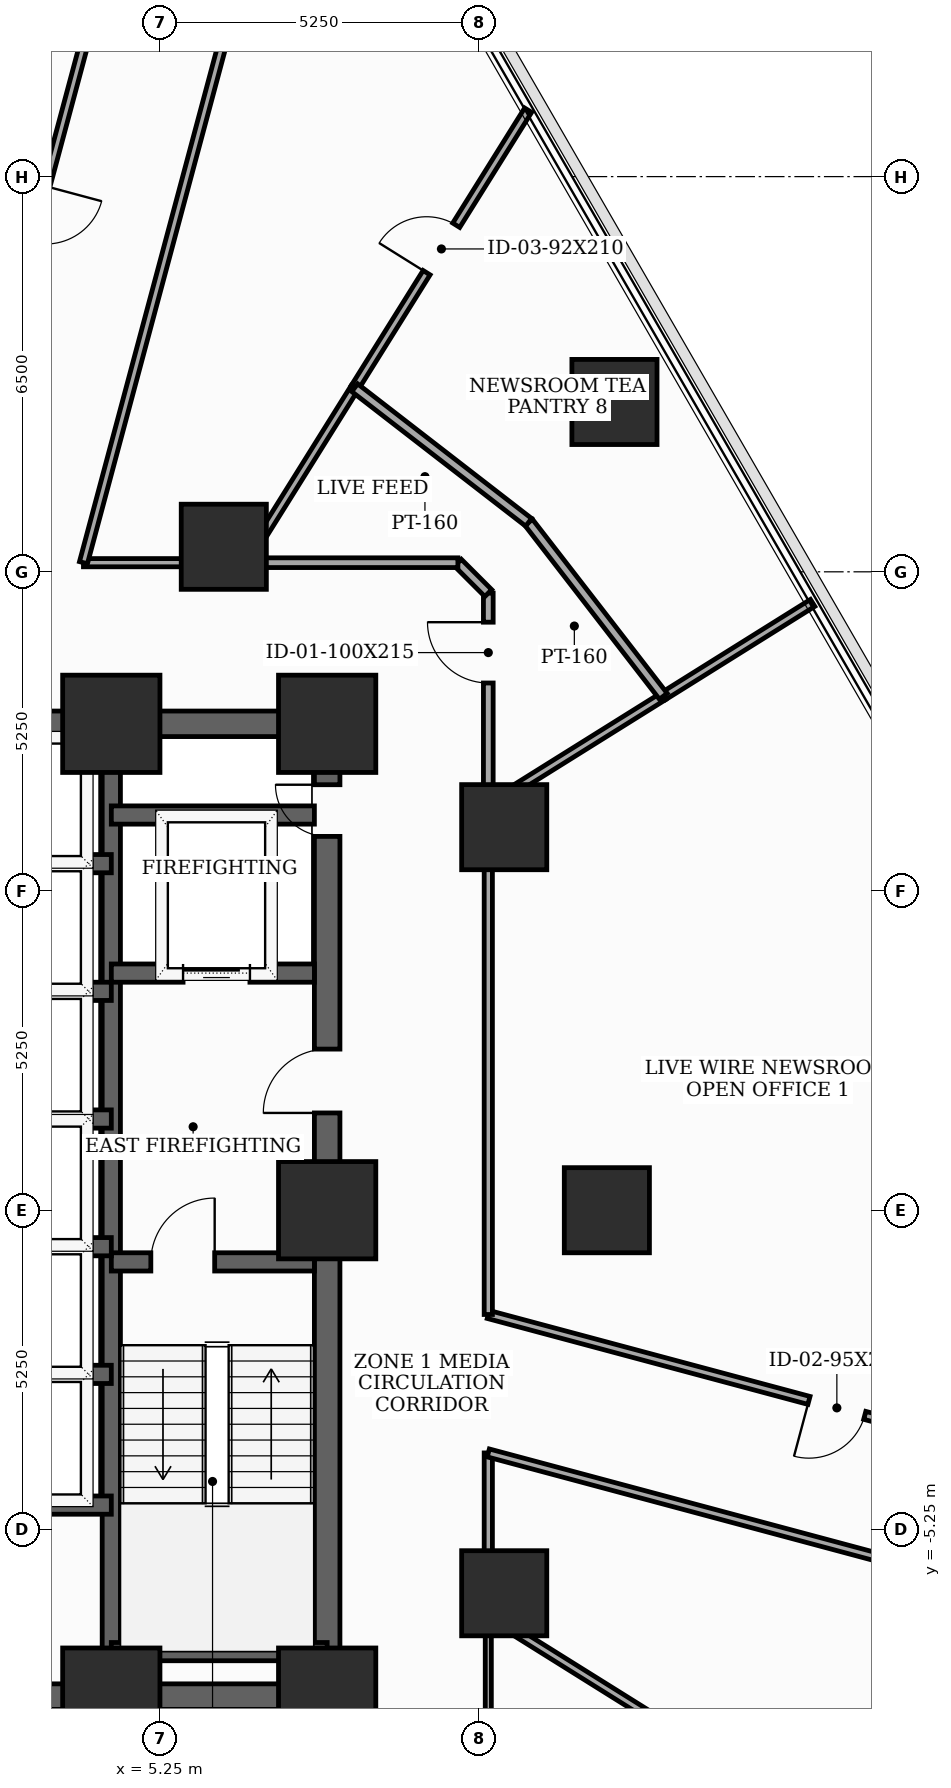
"""IFC4 building model, lengths in metres.
Left out: names, types, materials, properties, quantities, classifications, styles, units other than length and angle.
Written with IfcOpenShell. Run it as: python <this file> out.ifc"""

import sys

from ifc_helpers import new_model, si_unit, direction, frame, frame_2d, origin, origin_2d, place, context, subcontext, project, spatial, rectangle, extrude, element, fill, save


model = new_model("IFC4")
c1 = context("Model", 3, precision=1e-05, world=origin(), true_north=direction((0.0, 1.0)))
c2 = subcontext(c1, "Body", "Model", "MODEL_VIEW")
j1 = project(units=[si_unit("LENGTHUNIT", "METRE"), si_unit("PLANEANGLEUNIT", "RADIAN")], contexts=[c1])
p1 = place(None, origin())
s1 = spatial("IfcSite", under=j1, at=p1, CompositionType="ELEMENT")
p2 = place(p1, origin())
s2 = spatial("IfcBuilding", under=s1, at=p2, CompositionType="ELEMENT")
p3 = place(p2, frame((0.0, 0.0, 29.7)))
s3 = spatial("IfcBuildingStorey", under=s2, at=p3, CompositionType="ELEMENT", Elevation=29.7)
for number, where, z_axis, x_axis in (
    (1, (4.45, -8.0, 0.0), (0.0, 0.0, 1.0), (1.0, 0.0, 0.0)),
    (2, (8.0, -8.0, 0.0), (0.0, 0.0, 1.0), (1.0, 0.0, 0.0)),
    (3, (8.0, 0.0, 0.0), (0.0, 0.0, 1.0), (1.0, 0.0, 0.0)),
    (4, (8.0, 8.0, 0.0), (0.0, 0.0, 1.0), (1.0, 0.0, 0.0)),
    (5, (4.45, 8.0, 0.0), (0.0, 0.0, 1.0), (1.0, 0.0, 0.0)),
):
    element("IfcColumn", number, at=place(p3, frame(where, z_axis=z_axis, x_axis=x_axis)), inside=s3, PredefinedType="COLUMN", context=c2, shape_type="SweptSolid", body=[
        extrude(rectangle(XDim=1.6, YDim=1.6, at=origin_2d()), origin(), (0.0, 0.0, 1.0), 3.7),
    ])
for number, where, z_axis, x_axis in (
    (6, (12.6, 0.0, 0.0), (0.0, 0.0, 1.0), (1.0, 0.0, 0.0)),
    (7, (10.912, 6.3, 0.0), (0.0, 0.0, 1.0), (1.0, 0.0, 0.0)),
    (8, (6.3, 10.912, 0.0), (0.0, 0.0, 1.0), (1.0, 0.0, 0.0)),
    (9, (10.912, -6.3, 0.0), (0.0, 0.0, 1.0), (1.0, 0.0, 0.0)),
    (10, (12.725, 13.293, 0.0), (0.0, 0.0, 1.0), (1.0, 0.0, 0.0)),
):
    element("IfcColumn", number, at=place(p3, frame(where, z_axis=z_axis, x_axis=x_axis)), inside=s3, PredefinedType="COLUMN", context=c2, shape_type="SweptSolid", body=[
        extrude(rectangle(XDim=1.4, YDim=1.4, at=origin_2d()), origin(), (0.0, 0.0, 1.0), 3.7),
    ])
p4 = place(p3, frame((8.0, -8.0, 0.0), z_axis=(0.0, 0.0, 1.0), x_axis=(0.0, 1.0, 0.0)))
e11 = element("IfcWall", 11, at=p4, inside=s3, PredefinedType="SHEAR", context=c2, shape_type="SweptSolid", body=[
    extrude(rectangle(XDim=16.0, YDim=0.42, at=frame_2d((8.0, 0.0))), origin(), (0.0, 0.0, 1.0), 3.5),
])
p5 = place(p4, frame((9.6, 0.0, 0.0)))
e12 = element("IfcOpeningElement", 12, at=p5, cuts=e11, PredefinedType="OPENING", context=c2, shape_type="SweptSolid", body=[
    extrude(rectangle(XDim=1.05, YDim=2.15, at=frame_2d((0.525, 1.075))), frame((0.0, 0.22, 0.0), z_axis=(0.0, -1.0, 0.0), x_axis=(1.0, 0.0, 0.0)), (0.0, 0.0, 1.0), 0.44),
])
p6 = place(p4, frame((14.148, 0.0, 0.0)))
e13 = element("IfcOpeningElement", 13, at=p6, cuts=e11, PredefinedType="OPENING", context=c2, shape_type="SweptSolid", body=[
    extrude(rectangle(XDim=0.85, YDim=2.02, at=frame_2d((0.425, 1.01))), frame((0.0, 0.22, 0.0), z_axis=(0.0, -1.0, 0.0), x_axis=(1.0, 0.0, 0.0)), (0.0, 0.0, 1.0), 0.44),
])
p7 = place(p3, frame((-8.0, -8.0, 0.0), z_axis=(0.0, 0.0, 1.0), x_axis=(1.0, 0.0, 0.0)))
e14 = element("IfcWall", 14, at=p7, inside=s3, PredefinedType="SHEAR", context=c2, shape_type="SweptSolid", body=[
    extrude(rectangle(XDim=16.0, YDim=0.42, at=frame_2d((8.0, 0.0))), origin(), (0.0, 0.0, 1.0), 3.5),
])
p8 = place(p7, frame((7.52, 0.0, 0.0)))
e15 = element("IfcOpeningElement", 15, at=p8, cuts=e14, PredefinedType="OPENING", context=c2, shape_type="SweptSolid", body=[
    extrude(rectangle(XDim=0.95, YDim=2.1, at=frame_2d((0.475, 1.05))), frame((0.0, 0.22, 0.0), z_axis=(0.0, -1.0, 0.0), x_axis=(1.0, 0.0, 0.0)), (0.0, 0.0, 1.0), 0.44),
])
p9 = place(p3, frame((-8.0, 8.0, 0.0), z_axis=(0.0, 0.0, 1.0), x_axis=(1.0, 0.0, 0.0)))
e16 = element("IfcWall", 16, at=p9, inside=s3, PredefinedType="SHEAR", context=c2, shape_type="SweptSolid", body=[
    extrude(rectangle(XDim=16.0, YDim=0.42, at=frame_2d((8.0, 0.0))), origin(), (0.0, 0.0, 1.0), 3.5),
])
p10 = place(p9, frame((7.1, 0.0, 0.0)))
e17 = element("IfcOpeningElement", 17, at=p10, cuts=e16, PredefinedType="OPENING", context=c2, shape_type="SweptSolid", body=[
    extrude(rectangle(XDim=1.8, YDim=2.15, at=frame_2d((0.9, 1.075))), frame((0.0, 0.22, 0.0), z_axis=(0.0, -1.0, 0.0), x_axis=(1.0, 0.0, 0.0)), (0.0, 0.0, 1.0), 0.44),
])
p11 = place(p3, frame((4.45, -7.79, 0.0), z_axis=(0.0, 0.0, 1.0), x_axis=(0.0, 1.0, 0.0)))
e18 = element("IfcWall", 18, at=p11, inside=s3, PredefinedType="SHEAR", context=c2, shape_type="SweptSolid", body=[
    extrude(rectangle(XDim=15.58, YDim=0.3, at=frame_2d((7.79, 0.0))), origin(), (0.0, 0.0, 1.0), 3.5),
])
p12 = place(p3, frame((4.45, -0.85, 0.0), z_axis=(0.0, 0.0, 1.0), x_axis=(1.0, 0.0, 0.0)))
e19 = element("IfcWall", 19, at=p12, inside=s3, PredefinedType="SHEAR", context=c2, shape_type="SweptSolid", body=[
    extrude(rectangle(XDim=3.34, YDim=0.3, at=frame_2d((1.67, 0.0))), origin(), (0.0, 0.0, 1.0), 3.5),
])
p13 = place(p12, frame((0.65, 0.0, 0.0)))
e20 = element("IfcOpeningElement", 20, at=p13, cuts=e19, PredefinedType="OPENING", context=c2, shape_type="SweptSolid", body=[
    extrude(rectangle(XDim=1.05, YDim=2.15, at=frame_2d((0.525, 1.075))), frame((0.0, 0.16, 0.0), z_axis=(0.0, -1.0, 0.0), x_axis=(1.0, 0.0, 0.0)), (0.0, 0.0, 1.0), 0.32),
])
p14 = place(p3, frame((4.45, -7.26, 0.0), z_axis=(0.0, 0.0, 1.0), x_axis=(1.0, 0.0, 0.0)))
e21 = element("IfcWall", 21, at=p14, inside=s3, PredefinedType="SHEAR", context=c2, shape_type="SweptSolid", body=[
    extrude(rectangle(XDim=3.55, YDim=0.3, at=frame_2d((1.775, 0.0))), origin(), (0.0, 0.0, 1.0), 3.5),
])
p15 = place(p3, frame((4.45, 3.9, 0.0), z_axis=(0.0, 0.0, 1.0), x_axis=(1.0, 0.0, 0.0)))
e22 = element("IfcWall", 22, at=p15, inside=s3, PredefinedType="SHEAR", context=c2, shape_type="SweptSolid", body=[
    extrude(rectangle(XDim=3.34, YDim=0.3, at=frame_2d((1.67, 0.0))), origin(), (0.0, 0.0, 1.0), 3.5),
])
p16 = place(p15, frame((1.18, 0.0, 0.0)))
e23 = element("IfcOpeningElement", 23, at=p16, cuts=e22, PredefinedType="OPENING", context=c2, shape_type="SweptSolid", body=[
    extrude(rectangle(XDim=1.1, YDim=2.1, at=frame_2d((0.55, 1.05))), frame((0.0, 0.16, 0.0), z_axis=(0.0, -1.0, 0.0), x_axis=(1.0, 0.0, 0.0)), (0.0, 0.0, 1.0), 0.32),
])
p17 = place(p3, frame((4.45, 6.5, 0.0), z_axis=(0.0, 0.0, 1.0), x_axis=(1.0, 0.0, 0.0)))
e24 = element("IfcWall", 24, at=p17, inside=s3, PredefinedType="SHEAR", context=c2, shape_type="SweptSolid", body=[
    extrude(rectangle(XDim=3.34, YDim=0.3, at=frame_2d((1.67, 0.0))), origin(), (0.0, 0.0, 1.0), 3.5),
])
p18 = place(p3, frame((-4.45, -4.85, 0.0), z_axis=(0.0, 0.0, 1.0), x_axis=(1.0, 0.0, 0.0)))
e25 = element("IfcWall", 25, at=p18, inside=s3, PredefinedType="SHEAR", context=c2, shape_type="SweptSolid", body=[
    extrude(rectangle(XDim=8.9, YDim=0.3, at=frame_2d((4.45, 0.0))), origin(), (0.0, 0.0, 1.0), 3.5),
])
for number, where, z_axis, x_axis in (
    (26, (1.68, 1.5, 0.0), (0.0, 0.0, 1.0), (1.0, 0.0, 0.0)),
    (27, (1.68, 3.6, 0.0), (0.0, 0.0, 1.0), (1.0, 0.0, 0.0)),
    (28, (1.68, 5.7, 0.0), (0.0, 0.0, 1.0), (1.0, 0.0, 0.0)),
    (29, (1.68, -2.7, 0.0), (0.0, 0.0, 1.0), (1.0, 0.0, 0.0)),
    (30, (1.68, -0.6, 0.0), (0.0, 0.0, 1.0), (1.0, 0.0, 0.0)),
):
    element("IfcWall", number, at=place(p3, frame(where, z_axis=z_axis, x_axis=x_axis)), inside=s3, PredefinedType="SHEAR", context=c2, shape_type="SweptSolid", body=[
        extrude(rectangle(XDim=2.77, YDim=0.3, at=frame_2d((1.385, 0.0))), origin(), (0.0, 0.0, 1.0), 3.5),
    ])
p19 = place(p3, frame((10.65, -6.655, 0.0), z_axis=(0.0, 0.0, 1.0), x_axis=(0.0, 1.0, 0.0)))
e31 = element("IfcWall", 31, at=p19, inside=s3, PredefinedType="PARTITIONING", context=c2, shape_type="SweptSolid", body=[
    extrude(rectangle(XDim=2.663, YDim=0.135, at=frame_2d((1.332, 0.0))), origin(), (0.0, 0.0, 1.0), 2.785),
])
p20 = place(p3, frame((10.65, -3.992, 0.0), z_axis=(0.0, 0.0, 1.0), x_axis=(0.965906888357, -0.258889712088, 0.0)))
e32 = element("IfcWall", 32, at=p20, inside=s3, PredefinedType="PARTITIONING", context=c2, shape_type="SweptSolid", body=[
    extrude(rectangle(XDim=11.28, YDim=0.135, at=frame_2d((5.64, 0.0))), origin(), (0.0, 0.0, 1.0), 2.785),
])
p21 = place(p3, frame((22.115, -4.787, 0.0), z_axis=(0.0, 0.0, 1.0), x_axis=(-0.965926659449, 0.258815935688, 0.0)))
e33 = element("IfcWall", 33, at=p21, inside=s3, PredefinedType="PARTITIONING", context=c2, shape_type="SweptSolid", body=[
    extrude(rectangle(XDim=11.87, YDim=0.135, at=frame_2d((5.935, 0.0))), origin(), (0.0, 0.0, 1.0), 2.785),
])
p22 = place(p21, frame((5.46, 0.0, 0.0)))
e34 = element("IfcOpeningElement", 34, at=p22, cuts=e33, PredefinedType="OPENING", context=c2, shape_type="SweptSolid", body=[
    extrude(rectangle(XDim=0.95, YDim=2.1, at=frame_2d((0.475, 1.05))), frame((0.0, 0.077, 0.0), z_axis=(0.0, -1.0, 0.0), x_axis=(1.0, 0.0, 0.0)), (0.0, 0.0, 1.0), 0.155),
])
p23 = place(p3, frame((10.65, -1.715, 0.0), z_axis=(0.0, 0.0, 1.0), x_axis=(0.0, 1.0, 0.0)))
e35 = element("IfcWall", 35, at=p23, inside=s3, PredefinedType="PARTITIONING", context=c2, shape_type="SweptSolid", body=[
    extrude(rectangle(XDim=8.37, YDim=0.135, at=frame_2d((4.185, 0.0))), origin(), (0.0, 0.0, 1.0), 2.785),
])
p24 = place(p3, frame((6.655, 10.65, 0.0), z_axis=(0.0, 0.0, 1.0), x_axis=(-1.0, 0.0, 0.0)))
e36 = element("IfcWall", 36, at=p24, inside=s3, PredefinedType="PARTITIONING", context=c2, shape_type="SweptSolid", body=[
    extrude(rectangle(XDim=2.663, YDim=0.135, at=frame_2d((1.332, 0.0))), origin(), (0.0, 0.0, 1.0), 2.685),
])
p25 = place(p3, frame((3.992, 10.65, 0.0), z_axis=(0.0, 0.0, 1.0), x_axis=(0.258889712088, 0.965906888357, 0.0)))
e37 = element("IfcWall", 37, at=p25, inside=s3, PredefinedType="PARTITIONING", context=c2, shape_type="SweptSolid", body=[
    extrude(rectangle(XDim=11.28, YDim=0.135, at=frame_2d((5.64, 0.0))), origin(), (0.0, 0.0, 1.0), 2.785),
])
p26 = place(p3, frame((4.787, 22.115, 0.0), z_axis=(0.0, 0.0, 1.0), x_axis=(-0.258815935688, -0.965926659449, 0.0)))
e38 = element("IfcWall", 38, at=p26, inside=s3, PredefinedType="PARTITIONING", context=c2, shape_type="SweptSolid", body=[
    extrude(rectangle(XDim=11.87, YDim=0.135, at=frame_2d((5.935, 0.0))), origin(), (0.0, 0.0, 1.0), 2.785),
])
p27 = place(p26, frame((5.46, 0.0, 0.0)))
e39 = element("IfcOpeningElement", 39, at=p27, cuts=e38, PredefinedType="OPENING", context=c2, shape_type="SweptSolid", body=[
    extrude(rectangle(XDim=0.95, YDim=2.1, at=frame_2d((0.475, 1.05))), frame((0.0, 0.077, 0.0), z_axis=(0.0, -1.0, 0.0), x_axis=(1.0, 0.0, 0.0)), (0.0, 0.0, 1.0), 0.155),
])
p28 = place(p3, frame((10.65, -10.15, 0.0), z_axis=(0.0, 0.0, 1.0), x_axis=(0.0, 1.0, 0.0)))
e40 = element("IfcWall", 40, at=p28, inside=s3, PredefinedType="MOVABLE", context=c2, shape_type="SweptSolid", body=[
    extrude(rectangle(XDim=3.495, YDim=0.1, at=frame_2d((1.748, 0.0))), origin(), (0.0, 0.0, 1.0), 2.785),
])
p29 = place(p28, frame((0.868, 0.0, 0.0)))
e41 = element("IfcOpeningElement", 41, at=p29, cuts=e40, PredefinedType="OPENING", context=c2, shape_type="SweptSolid", body=[
    extrude(rectangle(XDim=0.92, YDim=2.1, at=frame_2d((0.46, 1.05))), frame((0.0, 0.06, 0.0), z_axis=(0.0, -1.0, 0.0), x_axis=(1.0, 0.0, 0.0)), (0.0, 0.0, 1.0), 0.12),
])
p30 = place(p3, frame((10.65, 6.655, 0.0), z_axis=(0.0, 0.0, 1.0), x_axis=(0.0, 1.0, 0.0)))
e42 = element("IfcWall", 42, at=p30, inside=s3, PredefinedType="PARTITIONING", context=c2, shape_type="SweptSolid", body=[
    extrude(rectangle(XDim=3.495, YDim=0.16, at=frame_2d((1.748, 0.0))), origin(), (0.0, 0.0, 1.0), 2.785),
])
p31 = place(p30, frame((2.016, 0.0, 0.0)))
e43 = element("IfcOpeningElement", 43, at=p31, cuts=e42, PredefinedType="OPENING", context=c2, shape_type="SweptSolid", body=[
    extrude(rectangle(XDim=1.0, YDim=2.15, at=frame_2d((0.5, 1.075))), frame((0.0, 0.09, 0.0), z_axis=(0.0, -1.0, 0.0), x_axis=(1.0, 0.0, 0.0)), (0.0, 0.0, 1.0), 0.18),
])
p32 = place(p3, frame((10.65, 10.15, 0.0), z_axis=(0.0, 0.0, 1.0), x_axis=(-0.707106781187, 0.707106781187, 0.0)))
e44 = element("IfcWall", 44, at=p32, inside=s3, PredefinedType="PARTITIONING", context=c2, shape_type="SweptSolid", body=[
    extrude(rectangle(XDim=0.707, YDim=0.16, at=frame_2d((0.354, 0.0))), origin(), (0.0, 0.0, 1.0), 3.5),
])
p33 = place(p3, frame((10.15, 10.65, 0.0), z_axis=(0.0, 0.0, 1.0), x_axis=(-1.0, 0.0, 0.0)))
e45 = element("IfcWall", 45, at=p33, inside=s3, PredefinedType="PARTITIONING", context=c2, shape_type="SweptSolid", body=[
    extrude(rectangle(XDim=3.495, YDim=0.16, at=frame_2d((1.748, 0.0))), origin(), (0.0, 0.0, 1.0), 2.785),
])
p34 = place(p3, frame((10.65, -6.655, 0.0), z_axis=(0.0, 0.0, 1.0), x_axis=(0.848052240981, -0.529912631069, 0.0)))
e46 = element("IfcWall", 46, at=p34, inside=s3, PredefinedType="PARTITIONING", context=c2, shape_type="SweptSolid", body=[
    extrude(rectangle(XDim=20.85, YDim=0.135, at=frame_2d((10.425, 0.0))), origin(), (0.0, 0.0, 1.0), 2.785),
])
p35 = place(p3, frame((13.528, 8.453, 0.0), z_axis=(0.0, 0.0, 1.0), x_axis=(-0.848131653937, -0.529785520366, 0.0)))
e47 = element("IfcWall", 47, at=p35, inside=s3, PredefinedType="PARTITIONING", context=c2, shape_type="SweptSolid", body=[
    extrude(rectangle(XDim=3.394, YDim=0.135, at=frame_2d((1.697, 0.0))), origin(), (0.0, 0.0, 1.0), 2.785),
])
p36 = place(p3, frame((15.984, 9.988, 0.0), z_axis=(0.0, 0.0, 1.0), x_axis=(-0.847941475479, -0.5300898548, 0.0)))
e48 = element("IfcWall", 48, at=p36, inside=s3, PredefinedType="PARTITIONING", context=c2, shape_type="SweptSolid", body=[
    extrude(rectangle(XDim=2.896, YDim=0.135, at=frame_2d((1.448, 0.0))), origin(), (0.0, 0.0, 1.0), 2.935),
])
p37 = place(p3, frame((6.655, 10.65, 0.0), z_axis=(0.0, 0.0, 1.0), x_axis=(0.529785520366, 0.848131653937, 0.0)))
e49 = element("IfcWall", 49, at=p37, inside=s3, PredefinedType="PARTITIONING", context=c2, shape_type="SweptSolid", body=[
    extrude(rectangle(XDim=3.394, YDim=0.135, at=frame_2d((1.697, 0.0))), origin(), (0.0, 0.0, 1.0), 2.685),
])
p38 = place(p3, frame((8.453, 13.528, 0.0), z_axis=(0.0, 0.0, 1.0), x_axis=(0.529933702465, 0.848039073977, 0.0)))
e50 = element("IfcWall", 50, at=p38, inside=s3, PredefinedType="PARTITIONING", context=c2, shape_type="SweptSolid", body=[
    extrude(rectangle(XDim=5.382, YDim=0.135, at=frame_2d((2.691, 0.0))), origin(), (0.0, 0.0, 1.0), 2.935),
])
p39 = place(p38, frame((2.231, 0.0, 0.0)))
e51 = element("IfcOpeningElement", 51, at=p39, cuts=e50, PredefinedType="OPENING", context=c2, shape_type="SweptSolid", body=[
    extrude(rectangle(XDim=0.92, YDim=2.1, at=frame_2d((0.46, 1.05))), frame((0.0, 0.077, 0.0), z_axis=(0.0, -1.0, 0.0), x_axis=(1.0, 0.0, 0.0)), (0.0, 0.0, 1.0), 0.155),
])
p40 = place(p3, frame((13.528, 8.453, 0.0), z_axis=(0.0, 0.0, 1.0), x_axis=(-0.612013931987, 0.790846980809, 0.0)))
e52 = element("IfcWall", 52, at=p40, inside=s3, PredefinedType="PARTITIONING", context=c2, shape_type="SweptSolid", body=[
    extrude(rectangle(XDim=3.618, YDim=0.16, at=frame_2d((1.809, 0.0))), origin(), (0.0, 0.0, 1.0), 3.5),
])
p41 = place(p3, frame((11.314, 11.314, 0.0), z_axis=(0.0, 0.0, 1.0), x_axis=(-0.790846980809, 0.612013931987, 0.0)))
e53 = element("IfcWall", 53, at=p41, inside=s3, PredefinedType="PARTITIONING", context=c2, shape_type="SweptSolid", body=[
    extrude(rectangle(XDim=3.618, YDim=0.16, at=frame_2d((1.809, 0.0))), origin(), (0.0, 0.0, 1.0), 2.685),
])
p42 = place(p5, origin())
e54 = element("IfcDoor", 54, at=p42, inside=s3, OperationType="SINGLE_SWING_LEFT", PredefinedType="DOOR", context=c2, shape_type="SweptSolid", body=[
    extrude(rectangle(XDim=1.05, YDim=2.15, at=frame_2d((0.525, 1.075))), frame((0.0, 0.025, 0.0), z_axis=(0.0, -1.0, 0.0), x_axis=(1.0, 0.0, 0.0)), (0.0, 0.0, 1.0), 0.05),
])
fill(e12, e54)
p43 = place(p6, origin())
e55 = element("IfcDoor", 55, at=p43, inside=s3, OperationType="SINGLE_SWING_RIGHT", PredefinedType="TRAPDOOR", context=c2, shape_type="SweptSolid", body=[
    extrude(rectangle(XDim=0.85, YDim=2.02, at=frame_2d((0.425, 1.01))), frame((0.0, 0.025, 0.0), z_axis=(0.0, -1.0, 0.0), x_axis=(1.0, 0.0, 0.0)), (0.0, 0.0, 1.0), 0.05),
])
fill(e13, e55)
p44 = place(p13, origin())
e56 = element("IfcDoor", 56, at=p44, inside=s3, OperationType="SINGLE_SWING_RIGHT", PredefinedType="DOOR", context=c2, shape_type="SweptSolid", body=[
    extrude(rectangle(XDim=1.05, YDim=2.15, at=frame_2d((0.525, 1.075))), frame((0.0, 0.025, 0.0), z_axis=(0.0, -1.0, 0.0), x_axis=(1.0, 0.0, 0.0)), (0.0, 0.0, 1.0), 0.05),
])
fill(e20, e56)
p45 = place(p16, origin())
e57 = element("IfcDoor", 57, at=p45, inside=s3, OperationType="SLIDING_TO_LEFT", PredefinedType="DOOR", context=c2, shape_type="SweptSolid", body=[
    extrude(rectangle(XDim=1.1, YDim=2.1, at=frame_2d((0.55, 1.05))), frame((0.0, 0.025, 0.0), z_axis=(0.0, -1.0, 0.0), x_axis=(1.0, 0.0, 0.0)), (0.0, 0.0, 1.0), 0.05),
])
fill(e23, e57)
p46 = place(p22, origin())
e58 = element("IfcDoor", 58, at=p46, inside=s3, OperationType="SINGLE_SWING_RIGHT", PredefinedType="DOOR", context=c2, shape_type="SweptSolid", body=[
    extrude(rectangle(XDim=0.95, YDim=2.1, at=frame_2d((0.475, 1.05))), frame((0.0, 0.025, 0.0), z_axis=(0.0, -1.0, 0.0), x_axis=(1.0, 0.0, 0.0)), (0.0, 0.0, 1.0), 0.05),
])
fill(e34, e58)
p47 = place(p31, origin())
e59 = element("IfcDoor", 59, at=p47, inside=s3, OperationType="SINGLE_SWING_RIGHT", PredefinedType="DOOR", context=c2, shape_type="SweptSolid", body=[
    extrude(rectangle(XDim=1.0, YDim=2.15, at=frame_2d((0.5, 1.075))), frame((0.0, 0.025, 0.0), z_axis=(0.0, -1.0, 0.0), x_axis=(1.0, 0.0, 0.0)), (0.0, 0.0, 1.0), 0.05),
])
fill(e43, e59)
p48 = place(p39, origin())
e60 = element("IfcDoor", 60, at=p48, inside=s3, OperationType="SINGLE_SWING_LEFT", PredefinedType="DOOR", context=c2, shape_type="SweptSolid", body=[
    extrude(rectangle(XDim=0.92, YDim=2.1, at=frame_2d((0.46, 1.05))), frame((0.0, 0.025, 0.0), z_axis=(0.0, -1.0, 0.0), x_axis=(1.0, 0.0, 0.0)), (0.0, 0.0, 1.0), 0.05),
])
fill(e51, e60)
save(model, sys.argv[1])
